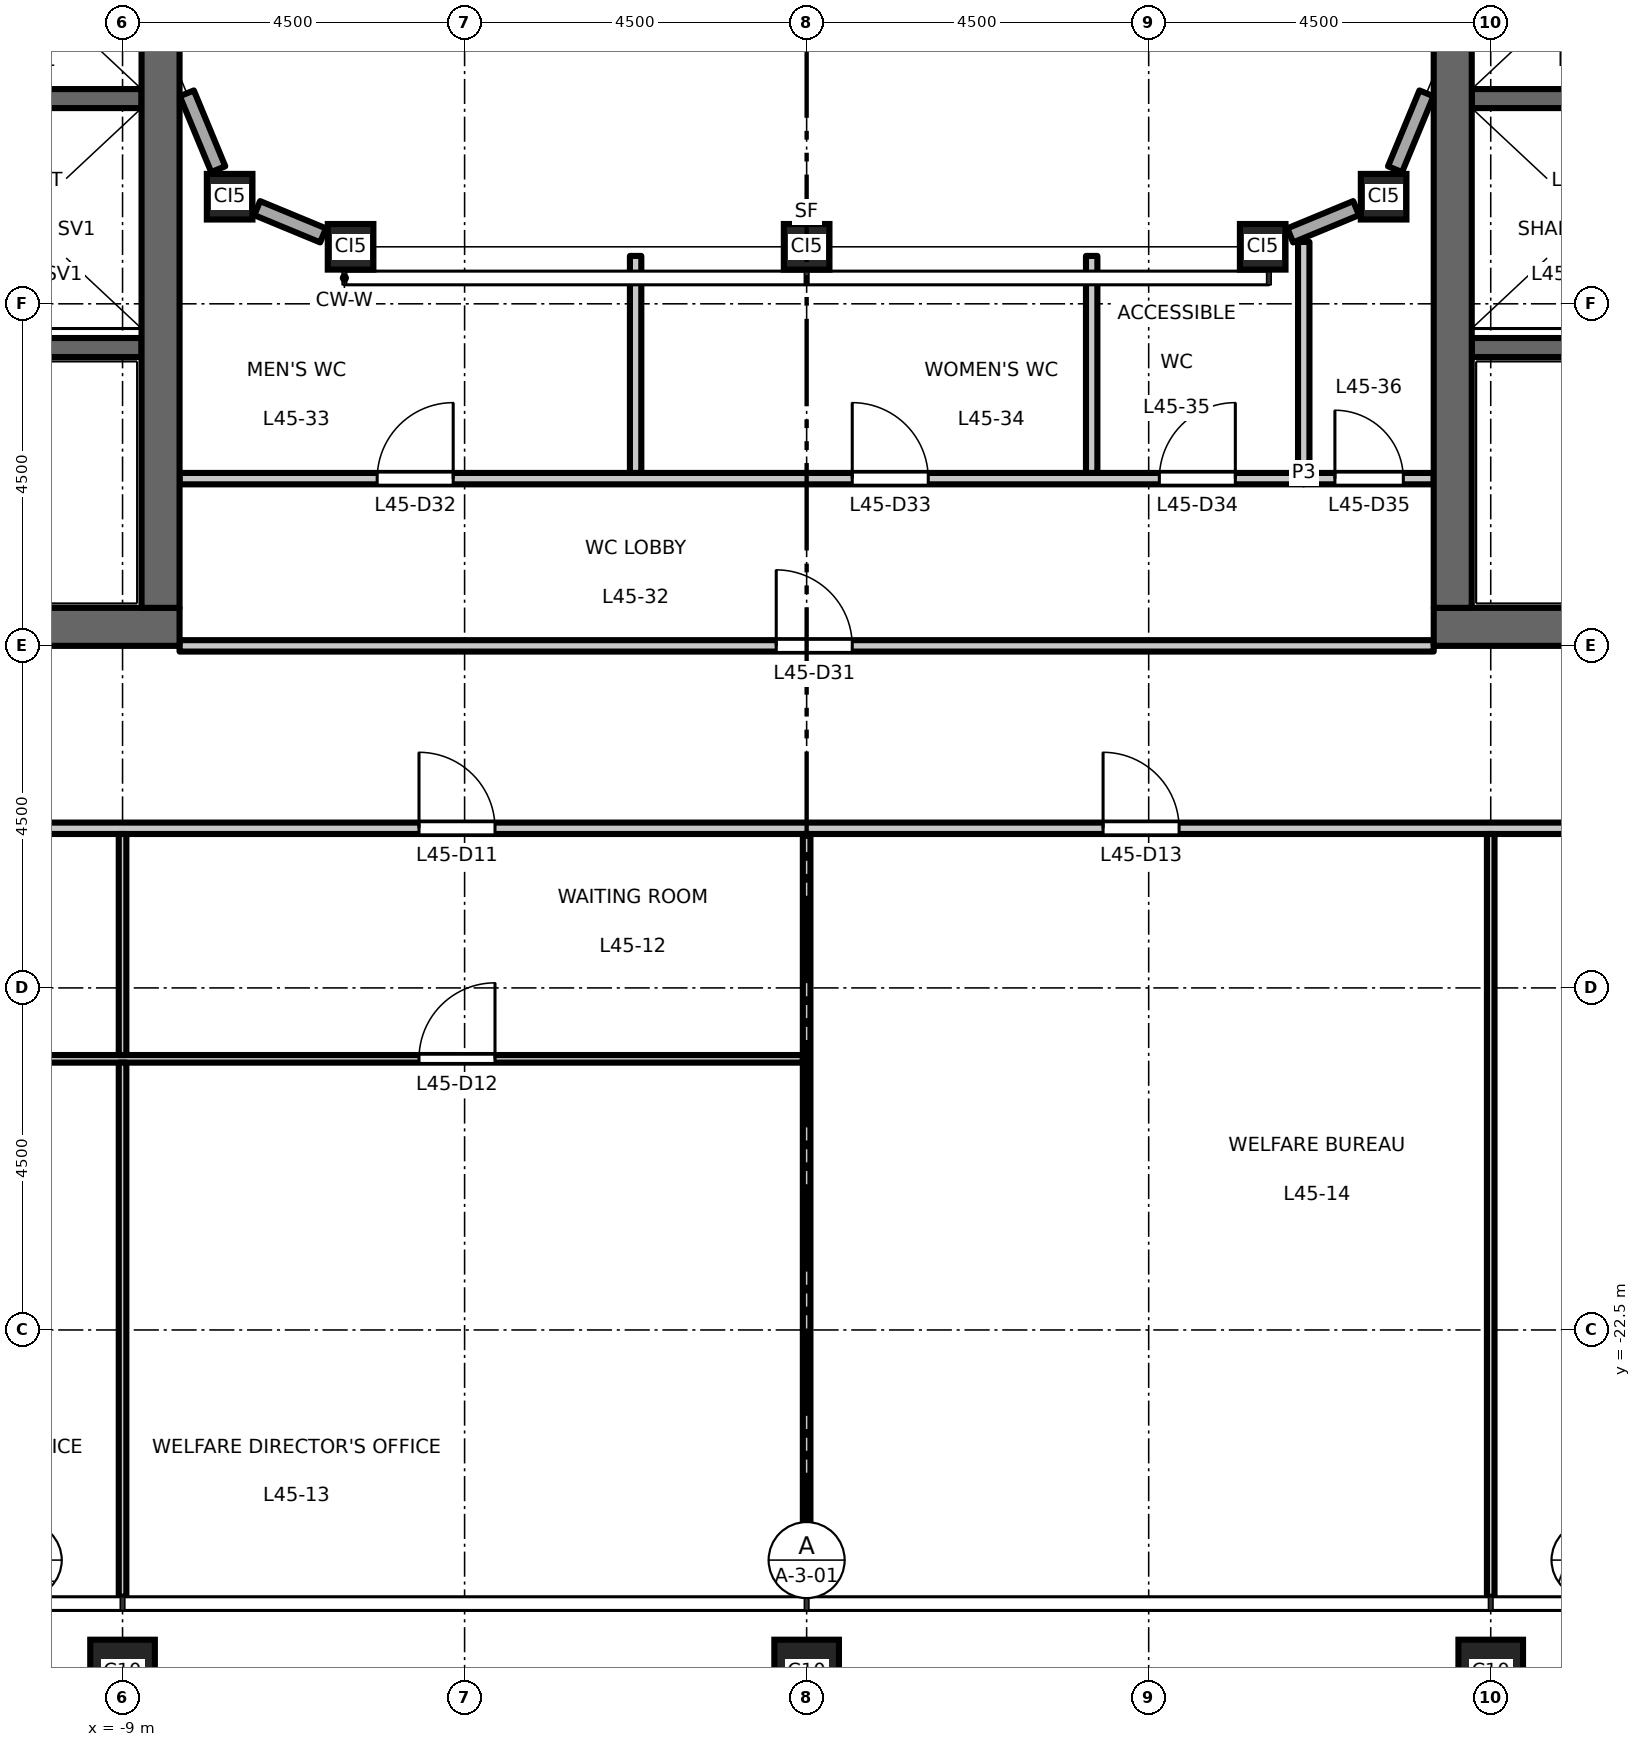
"""IFC4 building model, lengths in metres.
Left out: names, types, materials, properties, quantities, classifications, styles, units other than length and angle.
Written with IfcOpenShell. Run it as: python <this file> out.ifc"""

import sys

from ifc_helpers import new_model, si_unit, direction, frame, frame_2d, origin, origin_2d, place, context, subcontext, project, spatial, rectangle, hollow_rectangle, extrude, element, fill, save


model = new_model("IFC4")
c1 = context("Model", 3, precision=1e-05, world=origin(), true_north=direction((0.0, 1.0)))
c2 = subcontext(c1, "Body", "Model", "MODEL_VIEW")
j1 = project(units=[si_unit("LENGTHUNIT", "METRE"), si_unit("PLANEANGLEUNIT", "RADIAN")], contexts=[c1])
p1 = place(None, origin())
s1 = spatial("IfcSite", under=j1, at=p1, CompositionType="ELEMENT")
p2 = place(p1, origin())
s2 = spatial("IfcBuilding", under=s1, at=p2, CompositionType="ELEMENT")
p3 = place(p2, frame((0.0, 0.0, 210.7)))
s3 = spatial("IfcBuildingStorey", under=s2, at=p3, CompositionType="ELEMENT", Elevation=210.7)
for number, where, z_axis, x_axis in (
    (1, (-9.0, -27.0, 0.0), (0.0, 0.0, 1.0), (1.0, 0.0, 0.0)),
    (2, (0.0, -27.0, 0.0), (0.0, 0.0, 1.0), (1.0, 0.0, 0.0)),
    (3, (9.0, -27.0, 0.0), (0.0, 0.0, 1.0), (1.0, 0.0, 0.0)),
):
    element("IfcColumn", number, at=place(p3, frame(where, z_axis=z_axis, x_axis=x_axis)), inside=s3, PredefinedType="COLUMN", context=c2, shape_type="SweptSolid", body=[
        extrude(hollow_rectangle(XDim=0.85, YDim=0.85, WallThickness=0.05, at=origin_2d()), origin(), (0.0, 0.0, 1.0), 4.5),
    ])
for number, where, z_axis, x_axis in (
    (4, (-7.591, -7.591, 0.0), (0.0, 0.0, 1.0), (1.0, 0.0, 0.0)),
    (5, (-6.0, -8.25, 0.0), (0.0, 0.0, 1.0), (1.0, 0.0, 0.0)),
    (6, (0.0, -8.25, 0.0), (0.0, 0.0, 1.0), (1.0, 0.0, 0.0)),
    (7, (6.0, -8.25, 0.0), (0.0, 0.0, 1.0), (1.0, 0.0, 0.0)),
    (8, (7.591, -7.591, 0.0), (0.0, 0.0, 1.0), (1.0, 0.0, 0.0)),
):
    element("IfcColumn", number, at=place(p3, frame(where, z_axis=z_axis, x_axis=x_axis)), inside=s3, PredefinedType="COLUMN", context=c2, shape_type="SweptSolid", body=[
        extrude(hollow_rectangle(XDim=0.6, YDim=0.6, WallThickness=0.032, at=origin_2d()), origin(), (0.0, 0.0, 1.0), 4.5),
    ])
p4 = place(p3, frame((-8.75, -6.3, 0.0), z_axis=(0.0, 0.0, 1.0), x_axis=(-1.0, 0.0, 0.0)))
e9 = element("IfcWall", 9, at=p4, inside=s3, PredefinedType="SHEAR", context=c2, shape_type="SweptSolid", body=[
    extrude(rectangle(XDim=3.1, YDim=0.25, at=frame_2d((1.55, 0.0))), origin(), (0.0, 0.0, 1.0), 4.35),
])
p5 = place(p3, frame((-8.75, -9.575, 0.0), z_axis=(0.0, 0.0, 1.0), x_axis=(-1.0, 0.0, 0.0)))
e10 = element("IfcWall", 10, at=p5, inside=s3, PredefinedType="SHEAR", context=c2, shape_type="SweptSolid", body=[
    extrude(rectangle(XDim=8.0, YDim=0.25, at=frame_2d((4.0, 0.0))), origin(), (0.0, 0.0, 1.0), 4.35),
])
p6 = place(p5, frame((6.65, 0.0, 0.0)))
e11 = element("IfcOpeningElement", 11, at=p6, cuts=e10, PredefinedType="OPENING", context=c2, shape_type="SweptSolid", body=[
    extrude(rectangle(XDim=1.1, YDim=2.1, at=frame_2d((0.55, 1.05))), frame((0.0, 0.135, 0.0), z_axis=(0.0, -1.0, 0.0), x_axis=(1.0, 0.0, 0.0)), (0.0, 0.0, 1.0), 0.27),
])
p7 = place(p3, frame((-8.25, -13.25, 0.0), z_axis=(0.0, 0.0, 1.0), x_axis=(-1.0, 0.0, 0.0)))
e12 = element("IfcWall", 12, at=p7, inside=s3, PredefinedType="SHEAR", context=c2, shape_type="SweptSolid", body=[
    extrude(rectangle(XDim=13.5, YDim=0.5, at=frame_2d((6.75, 0.0))), origin(), (0.0, 0.0, 1.0), 4.35),
])
p8 = place(p3, frame((-8.5, -13.0, 0.0), z_axis=(0.0, 0.0, 1.0), x_axis=(0.0, 1.0, 0.0)))
e13 = element("IfcWall", 13, at=p8, inside=s3, PredefinedType="SHEAR", context=c2, shape_type="SweptSolid", body=[
    extrude(rectangle(XDim=26.0, YDim=0.5, at=frame_2d((13.0, 0.0))), origin(), (0.0, 0.0, 1.0), 4.35),
])
p9 = place(p3, frame((8.75, -6.3, 0.0), z_axis=(0.0, 0.0, 1.0), x_axis=(1.0, 0.0, 0.0)))
e14 = element("IfcWall", 14, at=p9, inside=s3, PredefinedType="SHEAR", context=c2, shape_type="SweptSolid", body=[
    extrude(rectangle(XDim=3.1, YDim=0.25, at=frame_2d((1.55, 0.0))), origin(), (0.0, 0.0, 1.0), 4.35),
])
p10 = place(p3, frame((8.75, -9.575, 0.0), z_axis=(0.0, 0.0, 1.0), x_axis=(1.0, 0.0, 0.0)))
e15 = element("IfcWall", 15, at=p10, inside=s3, PredefinedType="SHEAR", context=c2, shape_type="SweptSolid", body=[
    extrude(rectangle(XDim=8.0, YDim=0.25, at=frame_2d((4.0, 0.0))), origin(), (0.0, 0.0, 1.0), 4.35),
])
p11 = place(p10, frame((6.65, 0.0, 0.0)))
e16 = element("IfcOpeningElement", 16, at=p11, cuts=e15, PredefinedType="OPENING", context=c2, shape_type="SweptSolid", body=[
    extrude(rectangle(XDim=1.1, YDim=2.1, at=frame_2d((0.55, 1.05))), frame((0.0, 0.135, 0.0), z_axis=(0.0, -1.0, 0.0), x_axis=(1.0, 0.0, 0.0)), (0.0, 0.0, 1.0), 0.27),
])
p12 = place(p3, frame((8.25, -13.25, 0.0), z_axis=(0.0, 0.0, 1.0), x_axis=(1.0, 0.0, 0.0)))
e17 = element("IfcWall", 17, at=p12, inside=s3, PredefinedType="SHEAR", context=c2, shape_type="SweptSolid", body=[
    extrude(rectangle(XDim=13.5, YDim=0.5, at=frame_2d((6.75, 0.0))), origin(), (0.0, 0.0, 1.0), 4.35),
])
p13 = place(p3, frame((8.5, -13.0, 0.0), z_axis=(0.0, 0.0, 1.0), x_axis=(0.0, 1.0, 0.0)))
e18 = element("IfcWall", 18, at=p13, inside=s3, PredefinedType="SHEAR", context=c2, shape_type="SweptSolid", body=[
    extrude(rectangle(XDim=26.0, YDim=0.5, at=frame_2d((13.0, 0.0))), origin(), (0.0, 0.0, 1.0), 4.35),
])
p14 = place(p3, frame((6.362, -8.1, 0.0), z_axis=(0.0, 0.0, 1.0), x_axis=(0.923829670615, 0.382803787458, 0.0)))
e19 = element("IfcWall", 19, at=p14, inside=s3, PredefinedType="STANDARD", context=c2, shape_type="SweptSolid", body=[
    extrude(rectangle(XDim=0.938, YDim=0.2, at=frame_2d((0.469, 0.0))), origin(), (0.0, 0.0, 1.0), 3.918),
])
for number, where, z_axis, x_axis in (
    (20, (7.741, -7.229, 0.0), (0.0, 0.0, 1.0), (0.383, 0.924, 0.0)),
    (21, (-8.154, -6.231, 0.0), (0.0, 0.0, 1.0), (0.383, -0.924, 0.0)),
):
    element("IfcWall", number, at=place(p3, frame(where, z_axis=z_axis, x_axis=x_axis)), inside=s3, PredefinedType="STANDARD", context=c2, shape_type="SweptSolid", body=[
        extrude(rectangle(XDim=1.08, YDim=0.2, at=frame_2d((0.54, 0.0))), origin(), (0.0, 0.0, 1.0), 3.918),
    ])
p15 = place(p3, frame((-7.229, -7.741, 0.0), z_axis=(0.0, 0.0, 1.0), x_axis=(0.923829670615, -0.382803787458, 0.0)))
e22 = element("IfcWall", 22, at=p15, inside=s3, PredefinedType="STANDARD", context=c2, shape_type="SweptSolid", body=[
    extrude(rectangle(XDim=0.938, YDim=0.2, at=frame_2d((0.469, 0.0))), origin(), (0.0, 0.0, 1.0), 3.918),
])
p16 = place(p3, frame((-17.95, -18.933, 0.0), z_axis=(0.0, 0.0, 1.0), x_axis=(1.0, 0.0, 0.0)))
e23 = element("IfcWall", 23, at=p16, inside=s3, PredefinedType="PARTITIONING", context=c2, shape_type="SweptSolid", body=[
    extrude(rectangle(XDim=17.9, YDim=0.1, at=frame_2d((8.95, 0.0))), origin(), (0.0, 0.0, 1.0), 4.35),
])
p17 = place(p16, frame((3.85, 0.0, 0.0)))
e24 = element("IfcOpeningElement", 24, at=p17, cuts=e23, PredefinedType="OPENING", context=c2, shape_type="SweptSolid", body=[
    extrude(rectangle(XDim=1.0, YDim=2.1, at=frame_2d((0.5, 1.05))), frame((0.0, 0.06, 0.0), z_axis=(0.0, -1.0, 0.0), x_axis=(1.0, 0.0, 0.0)), (0.0, 0.0, 1.0), 0.12),
])
p18 = place(p16, frame((12.85, 0.0, 0.0)))
e25 = element("IfcOpeningElement", 25, at=p18, cuts=e23, PredefinedType="OPENING", context=c2, shape_type="SweptSolid", body=[
    extrude(rectangle(XDim=1.0, YDim=2.1, at=frame_2d((0.5, 1.05))), frame((0.0, 0.06, 0.0), z_axis=(0.0, -1.0, 0.0), x_axis=(1.0, 0.0, 0.0)), (0.0, 0.0, 1.0), 0.12),
])
p19 = place(p3, frame((-24.225, -15.9, 0.0), z_axis=(0.0, 0.0, 1.0), x_axis=(1.0, 0.0, 0.0)))
e26 = element("IfcWall", 26, at=p19, inside=s3, PredefinedType="PARTITIONING", context=c2, shape_type="SweptSolid", body=[
    extrude(rectangle(XDim=48.45, YDim=0.15, at=frame_2d((24.225, 0.0))), origin(), (0.0, 0.0, 1.0), 4.35),
])
p20 = place(p19, frame((10.125, 0.0, 0.0)))
e27 = element("IfcOpeningElement", 27, at=p20, cuts=e26, PredefinedType="OPENING", context=c2, shape_type="SweptSolid", body=[
    extrude(rectangle(XDim=1.0, YDim=2.1, at=frame_2d((0.5, 1.05))), frame((0.0, 0.085, 0.0), z_axis=(0.0, -1.0, 0.0), x_axis=(1.0, 0.0, 0.0)), (0.0, 0.0, 1.0), 0.17),
])
p21 = place(p19, frame((19.125, 0.0, 0.0)))
e28 = element("IfcOpeningElement", 28, at=p21, cuts=e26, PredefinedType="OPENING", context=c2, shape_type="SweptSolid", body=[
    extrude(rectangle(XDim=1.0, YDim=2.1, at=frame_2d((0.5, 1.05))), frame((0.0, 0.085, 0.0), z_axis=(0.0, -1.0, 0.0), x_axis=(1.0, 0.0, 0.0)), (0.0, 0.0, 1.0), 0.17),
])
p22 = place(p19, frame((28.125, 0.0, 0.0)))
e29 = element("IfcOpeningElement", 29, at=p22, cuts=e26, PredefinedType="OPENING", context=c2, shape_type="SweptSolid", body=[
    extrude(rectangle(XDim=1.0, YDim=2.1, at=frame_2d((0.5, 1.05))), frame((0.0, 0.085, 0.0), z_axis=(0.0, -1.0, 0.0), x_axis=(1.0, 0.0, 0.0)), (0.0, 0.0, 1.0), 0.17),
])
p23 = place(p19, frame((37.125, 0.0, 0.0)))
e30 = element("IfcOpeningElement", 30, at=p23, cuts=e26, PredefinedType="OPENING", context=c2, shape_type="SweptSolid", body=[
    extrude(rectangle(XDim=1.0, YDim=2.1, at=frame_2d((0.5, 1.05))), frame((0.0, 0.085, 0.0), z_axis=(0.0, -1.0, 0.0), x_axis=(1.0, 0.0, 0.0)), (0.0, 0.0, 1.0), 0.17),
])
p24 = place(p19, frame((44.875, 0.0, 0.0)))
e31 = element("IfcOpeningElement", 31, at=p24, cuts=e26, PredefinedType="OPENING", context=c2, shape_type="SweptSolid", body=[
    extrude(rectangle(XDim=1.0, YDim=2.1, at=frame_2d((0.5, 1.05))), frame((0.0, 0.085, 0.0), z_axis=(0.0, -1.0, 0.0), x_axis=(1.0, 0.0, 0.0)), (0.0, 0.0, 1.0), 0.17),
])
p25 = place(p3, frame((-8.25, -13.5, 0.0), z_axis=(0.0, 0.0, 1.0), x_axis=(1.0, 0.0, 0.0)))
e32 = element("IfcWall", 32, at=p25, inside=s3, PredefinedType="PARTITIONING", context=c2, shape_type="SweptSolid", body=[
    extrude(rectangle(XDim=16.5, YDim=0.15, at=frame_2d((8.25, 0.0))), origin(), (0.0, 0.0, 1.0), 3.95),
])
p26 = place(p25, frame((7.85, 0.0, 0.0)))
e33 = element("IfcOpeningElement", 33, at=p26, cuts=e32, PredefinedType="OPENING", context=c2, shape_type="SweptSolid", body=[
    extrude(rectangle(XDim=1.0, YDim=2.1, at=frame_2d((0.5, 1.05))), frame((0.0, 0.085, 0.0), z_axis=(0.0, -1.0, 0.0), x_axis=(1.0, 0.0, 0.0)), (0.0, 0.0, 1.0), 0.17),
])
p27 = place(p3, frame((-8.25, -11.3, 0.0), z_axis=(0.0, 0.0, 1.0), x_axis=(1.0, 0.0, 0.0)))
e34 = element("IfcWall", 34, at=p27, inside=s3, PredefinedType="PARTITIONING", context=c2, shape_type="SweptSolid", body=[
    extrude(rectangle(XDim=14.79, YDim=0.15, at=frame_2d((7.395, 0.0))), origin(), (0.0, 0.0, 1.0), 4.35),
])
p28 = place(p27, frame((2.6, 0.0, 0.0)))
e35 = element("IfcOpeningElement", 35, at=p28, cuts=e34, PredefinedType="OPENING", context=c2, shape_type="SweptSolid", body=[
    extrude(rectangle(XDim=1.0, YDim=2.1, at=frame_2d((0.5, 1.05))), frame((0.0, 0.085, 0.0), z_axis=(0.0, -1.0, 0.0), x_axis=(1.0, 0.0, 0.0)), (0.0, 0.0, 1.0), 0.17),
])
p29 = place(p27, frame((8.85, 0.0, 0.0)))
e36 = element("IfcOpeningElement", 36, at=p29, cuts=e34, PredefinedType="OPENING", context=c2, shape_type="SweptSolid", body=[
    extrude(rectangle(XDim=1.0, YDim=2.1, at=frame_2d((0.5, 1.05))), frame((0.0, 0.085, 0.0), z_axis=(0.0, -1.0, 0.0), x_axis=(1.0, 0.0, 0.0)), (0.0, 0.0, 1.0), 0.17),
])
p30 = place(p27, frame((12.89, 0.0, 0.0)))
e37 = element("IfcOpeningElement", 37, at=p30, cuts=e34, PredefinedType="OPENING", context=c2, shape_type="SweptSolid", body=[
    extrude(rectangle(XDim=1.0, YDim=2.1, at=frame_2d((0.5, 1.05))), frame((0.0, 0.085, 0.0), z_axis=(0.0, -1.0, 0.0), x_axis=(1.0, 0.0, 0.0)), (0.0, 0.0, 1.0), 0.17),
])
p31 = place(p3, frame((6.54, -11.3, 0.0), z_axis=(0.0, 0.0, 1.0), x_axis=(1.0, 0.0, 0.0)))
e38 = element("IfcWall", 38, at=p31, inside=s3, PredefinedType="PARTITIONING", context=c2, shape_type="SweptSolid", body=[
    extrude(rectangle(XDim=1.71, YDim=0.15, at=frame_2d((0.855, 0.0))), origin(), (0.0, 0.0, 1.0), 4.35),
])
p32 = place(p31, frame((0.41, 0.0, 0.0)))
e39 = element("IfcOpeningElement", 39, at=p32, cuts=e38, PredefinedType="OPENING", context=c2, shape_type="SweptSolid", body=[
    extrude(rectangle(XDim=0.9, YDim=2.1, at=frame_2d((0.45, 1.05))), frame((0.0, 0.085, 0.0), z_axis=(0.0, -1.0, 0.0), x_axis=(1.0, 0.0, 0.0)), (0.0, 0.0, 1.0), 0.17),
])
p33 = place(p3, frame((-9.0, -26.01, 0.0), z_axis=(0.0, 0.0, 1.0), x_axis=(0.0, 1.0, 0.0)))
e40 = element("IfcWall", 40, at=p33, inside=s3, PredefinedType="PARTITIONING", context=c2, shape_type="SweptSolid", body=[
    extrude(rectangle(XDim=7.027, YDim=0.1, at=frame_2d((3.514, 0.0))), origin(), (0.0, 0.0, 1.0), 3.65),
])
p34 = place(p3, frame((-9.0, -18.883, 0.0), z_axis=(0.0, 0.0, 1.0), x_axis=(0.0, 1.0, 0.0)))
e41 = element("IfcWall", 41, at=p34, inside=s3, PredefinedType="PARTITIONING", context=c2, shape_type="SweptSolid", body=[
    extrude(rectangle(XDim=2.908, YDim=0.1, at=frame_2d((1.454, 0.0))), origin(), (0.0, 0.0, 1.0), 3.65),
])
p35 = place(p3, frame((-2.25, -11.225, 0.0), z_axis=(0.0, 0.0, 1.0), x_axis=(0.0, 1.0, 0.0)))
e42 = element("IfcWall", 42, at=p35, inside=s3, PredefinedType="PARTITIONING", context=c2, shape_type="SweptSolid", body=[
    extrude(rectangle(XDim=2.855, YDim=0.15, at=frame_2d((1.427, 0.0))), origin(), (0.0, 0.0, 1.0), 4.35),
])
p36 = place(p3, frame((0.0, -26.01, 0.0), z_axis=(0.0, 0.0, 1.0), x_axis=(0.0, 1.0, 0.0)))
e43 = element("IfcWall", 43, at=p36, inside=s3, PredefinedType="PARTITIONING", context=c2, shape_type="SweptSolid", body=[
    extrude(rectangle(XDim=10.035, YDim=0.1, at=frame_2d((5.018, 0.0))), origin(), (0.0, 0.0, 1.0), 3.55),
])
p37 = place(p3, frame((3.75, -11.225, 0.0), z_axis=(0.0, 0.0, 1.0), x_axis=(0.0, 1.0, 0.0)))
e44 = element("IfcWall", 44, at=p37, inside=s3, PredefinedType="PARTITIONING", context=c2, shape_type="SweptSolid", body=[
    extrude(rectangle(XDim=2.855, YDim=0.15, at=frame_2d((1.427, 0.0))), origin(), (0.0, 0.0, 1.0), 4.35),
])
p38 = place(p3, frame((6.54, -11.225, 0.0), z_axis=(0.0, 0.0, 1.0), x_axis=(0.0, 1.0, 0.0)))
e45 = element("IfcWall", 45, at=p38, inside=s3, PredefinedType="PARTITIONING", context=c2, shape_type="SweptSolid", body=[
    extrude(rectangle(XDim=3.039, YDim=0.15, at=frame_2d((1.52, 0.0))), origin(), (0.0, 0.0, 1.0), 4.35),
])
p39 = place(p3, frame((9.0, -26.01, 0.0), z_axis=(0.0, 0.0, 1.0), x_axis=(0.0, 1.0, 0.0)))
e46 = element("IfcWall", 46, at=p39, inside=s3, PredefinedType="PARTITIONING", context=c2, shape_type="SweptSolid", body=[
    extrude(rectangle(XDim=10.035, YDim=0.1, at=frame_2d((5.018, 0.0))), origin(), (0.0, 0.0, 1.0), 3.65),
])
p40 = place(p21, origin())
e47 = element("IfcDoor", 47, at=p40, inside=s3, OperationType="SINGLE_SWING_LEFT", PredefinedType="DOOR", context=c2, shape_type="SweptSolid", body=[
    extrude(rectangle(XDim=1.0, YDim=2.1, at=frame_2d((0.5, 1.05))), frame((0.0, 0.025, 0.0), z_axis=(0.0, -1.0, 0.0), x_axis=(1.0, 0.0, 0.0)), (0.0, 0.0, 1.0), 0.05),
])
fill(e28, e47)
p41 = place(p18, origin())
e48 = element("IfcDoor", 48, at=p41, inside=s3, OperationType="SINGLE_SWING_RIGHT", PredefinedType="DOOR", context=c2, shape_type="SweptSolid", body=[
    extrude(rectangle(XDim=1.0, YDim=2.1, at=frame_2d((0.5, 1.05))), frame((0.0, 0.025, 0.0), z_axis=(0.0, -1.0, 0.0), x_axis=(1.0, 0.0, 0.0)), (0.0, 0.0, 1.0), 0.05),
])
fill(e25, e48)
p42 = place(p22, origin())
e49 = element("IfcDoor", 49, at=p42, inside=s3, OperationType="SINGLE_SWING_LEFT", PredefinedType="DOOR", context=c2, shape_type="SweptSolid", body=[
    extrude(rectangle(XDim=1.0, YDim=2.1, at=frame_2d((0.5, 1.05))), frame((0.0, 0.025, 0.0), z_axis=(0.0, -1.0, 0.0), x_axis=(1.0, 0.0, 0.0)), (0.0, 0.0, 1.0), 0.05),
])
fill(e29, e49)
p43 = place(p26, origin())
e50 = element("IfcDoor", 50, at=p43, inside=s3, OperationType="SINGLE_SWING_LEFT", PredefinedType="DOOR", context=c2, shape_type="SweptSolid", body=[
    extrude(rectangle(XDim=1.0, YDim=2.1, at=frame_2d((0.5, 1.05))), frame((0.0, 0.025, 0.0), z_axis=(0.0, -1.0, 0.0), x_axis=(1.0, 0.0, 0.0)), (0.0, 0.0, 1.0), 0.05),
])
fill(e33, e50)
p44 = place(p28, origin())
e51 = element("IfcDoor", 51, at=p44, inside=s3, OperationType="SINGLE_SWING_RIGHT", PredefinedType="DOOR", context=c2, shape_type="SweptSolid", body=[
    extrude(rectangle(XDim=1.0, YDim=2.1, at=frame_2d((0.5, 1.05))), frame((0.0, 0.025, 0.0), z_axis=(0.0, -1.0, 0.0), x_axis=(1.0, 0.0, 0.0)), (0.0, 0.0, 1.0), 0.05),
])
fill(e35, e51)
p45 = place(p29, origin())
e52 = element("IfcDoor", 52, at=p45, inside=s3, OperationType="SINGLE_SWING_LEFT", PredefinedType="DOOR", context=c2, shape_type="SweptSolid", body=[
    extrude(rectangle(XDim=1.0, YDim=2.1, at=frame_2d((0.5, 1.05))), frame((0.0, 0.025, 0.0), z_axis=(0.0, -1.0, 0.0), x_axis=(1.0, 0.0, 0.0)), (0.0, 0.0, 1.0), 0.05),
])
fill(e36, e52)
p46 = place(p30, origin())
e53 = element("IfcDoor", 53, at=p46, inside=s3, OperationType="SINGLE_SWING_RIGHT", PredefinedType="DOOR", context=c2, shape_type="SweptSolid", body=[
    extrude(rectangle(XDim=1.0, YDim=2.1, at=frame_2d((0.5, 1.05))), frame((0.0, 0.025, 0.0), z_axis=(0.0, -1.0, 0.0), x_axis=(1.0, 0.0, 0.0)), (0.0, 0.0, 1.0), 0.05),
])
fill(e37, e53)
p47 = place(p32, origin())
e54 = element("IfcDoor", 54, at=p47, inside=s3, OperationType="SINGLE_SWING_LEFT", PredefinedType="DOOR", context=c2, shape_type="SweptSolid", body=[
    extrude(rectangle(XDim=0.9, YDim=2.1, at=frame_2d((0.45, 1.05))), frame((0.0, 0.025, 0.0), z_axis=(0.0, -1.0, 0.0), x_axis=(1.0, 0.0, 0.0)), (0.0, 0.0, 1.0), 0.05),
])
fill(e39, e54)
save(model, sys.argv[1])
